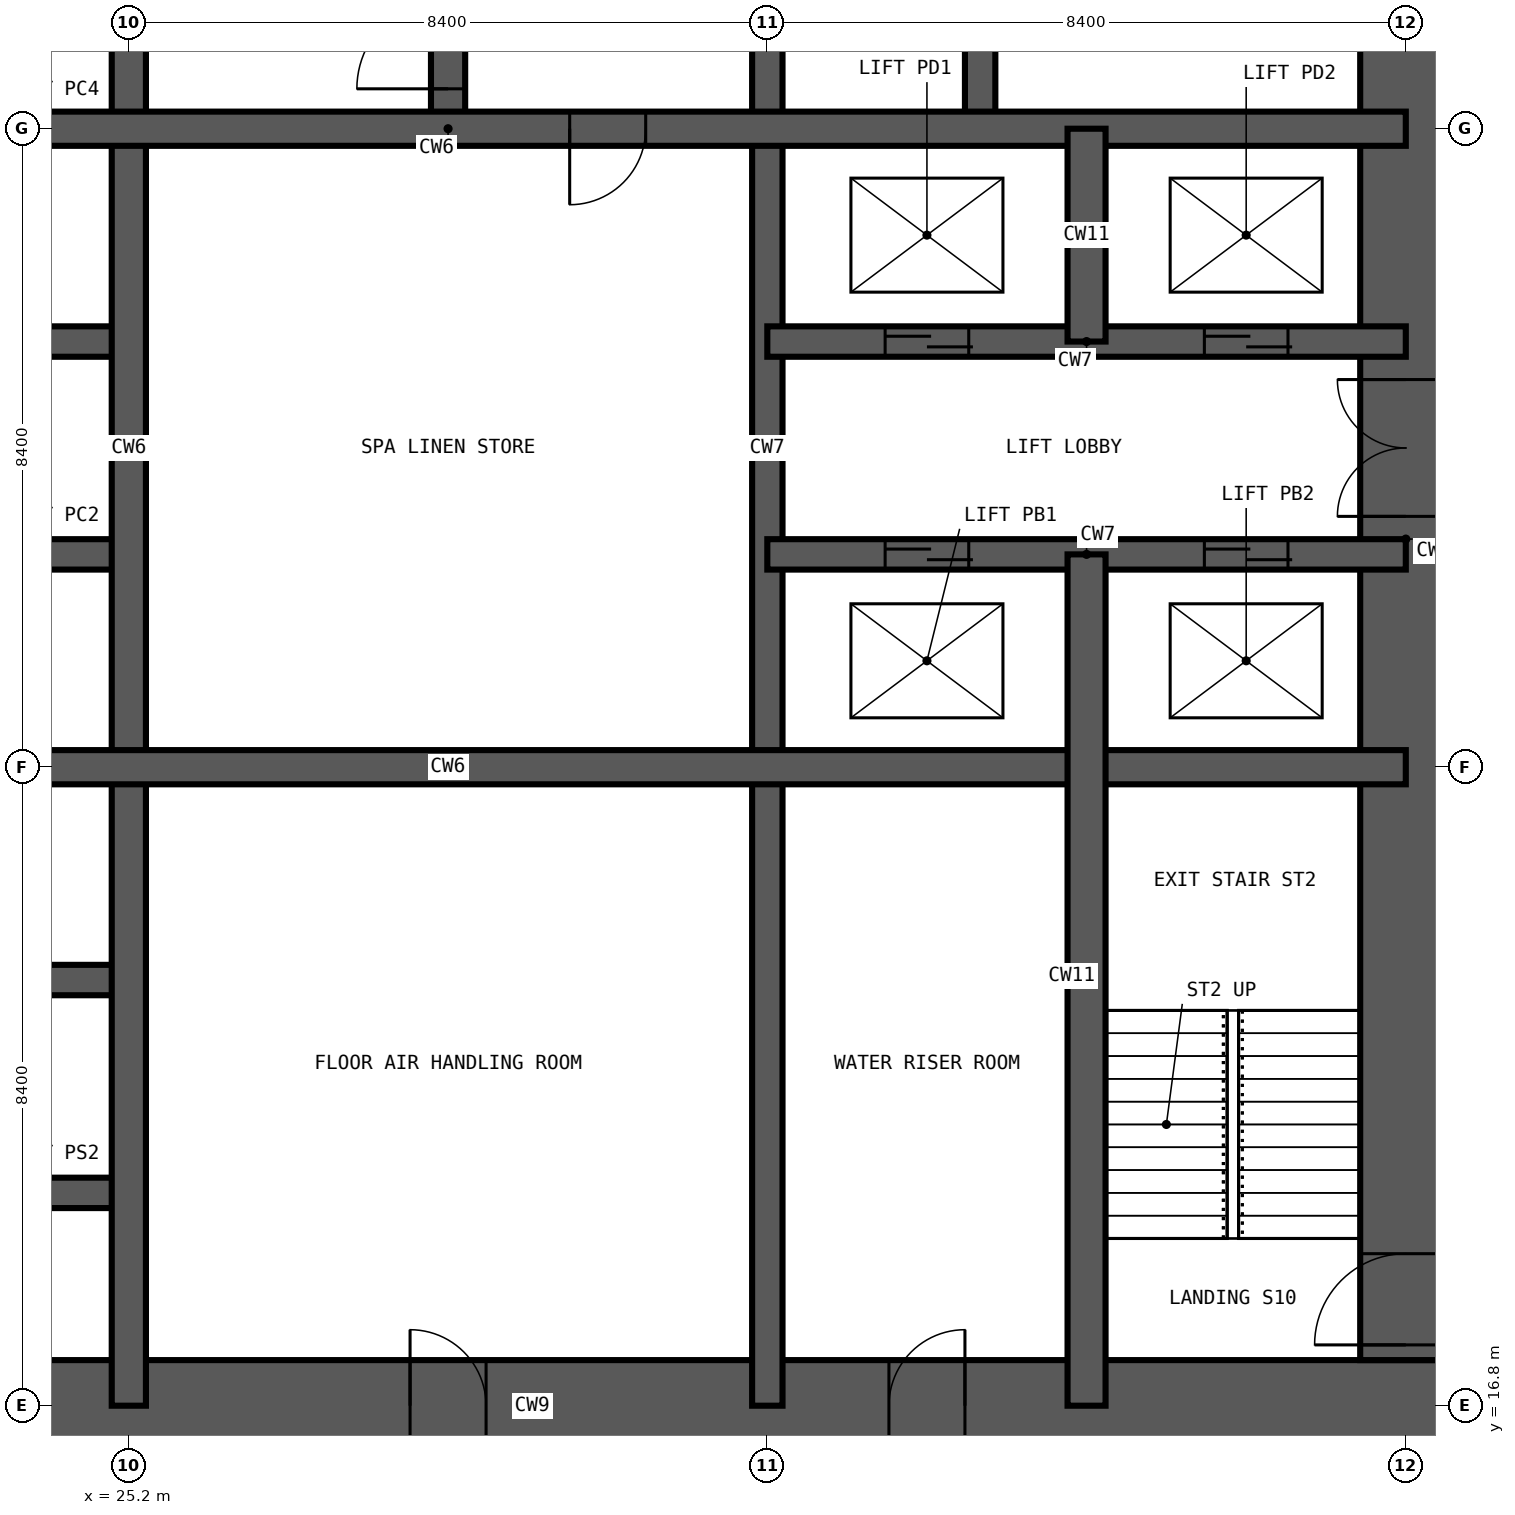
"""IFC4 building model, lengths in metres.
Left out: names, types, materials, properties, quantities, classifications, styles, units other than length and angle.
Written with IfcOpenShell. Run it as: python <this file> out.ifc"""

import sys

from ifc_helpers import new_model, si_unit, direction, frame, frame_2d, origin, place, context, subcontext, project, spatial, rectangle, extrude, element, fill, save


model = new_model("IFC4")
c1 = context("Model", 3, precision=1e-05, world=origin(), true_north=direction((0.0, 1.0)))
c2 = subcontext(c1, "Body", "Model", "MODEL_VIEW")
j1 = project(units=[si_unit("LENGTHUNIT", "METRE"), si_unit("PLANEANGLEUNIT", "RADIAN")], contexts=[c1])
p1 = place(None, origin())
s1 = spatial("IfcSite", under=j1, at=p1, CompositionType="ELEMENT")
p2 = place(p1, origin())
s2 = spatial("IfcBuilding", under=s1, at=p2, CompositionType="ELEMENT")
p3 = place(p2, frame((0.0, 0.0, 147.6)))
s3 = spatial("IfcBuildingStorey", under=s2, at=p3, CompositionType="ELEMENT", Elevation=147.6)
p4 = place(p3, frame((16.2, 16.8, -0.35), z_axis=(0.0, 0.0, 1.0), x_axis=(1.0, 0.0, 0.0)))
e1 = element("IfcWall", 1, at=p4, inside=s3, PredefinedType="SHEAR", context=c2, shape_type="SweptSolid", body=[
    extrude(rectangle(XDim=26.4, YDim=1.2, at=frame_2d((13.2, 0.0))), origin(), (0.0, 0.0, 1.0), 5.95),
])
p5 = place(p4, frame((12.7, 0.0, 0.35)))
e2 = element("IfcOpeningElement", 2, at=p5, cuts=e1, PredefinedType="OPENING", context=c2, shape_type="SweptSolid", body=[
    extrude(rectangle(XDim=1.0, YDim=2.1, at=frame_2d((0.5, 1.05))), frame((0.0, 0.61, 0.0), z_axis=(0.0, -1.0, 0.0), x_axis=(1.0, 0.0, 0.0)), (0.0, 0.0, 1.0), 1.22),
])
p6 = place(p4, frame((19.0, 0.0, 0.35)))
e3 = element("IfcOpeningElement", 3, at=p6, cuts=e1, PredefinedType="OPENING", context=c2, shape_type="SweptSolid", body=[
    extrude(rectangle(XDim=1.0, YDim=2.1, at=frame_2d((0.5, 1.05))), frame((0.0, 0.61, 0.0), z_axis=(0.0, -1.0, 0.0), x_axis=(1.0, 0.0, 0.0)), (0.0, 0.0, 1.0), 1.22),
])
p7 = place(p3, frame((42.0, 17.4, -0.35), z_axis=(0.0, 0.0, 1.0), x_axis=(0.0, 1.0, 0.0)))
e4 = element("IfcWall", 4, at=p7, inside=s3, PredefinedType="SHEAR", context=c2, shape_type="SweptSolid", body=[
    extrude(rectangle(XDim=24.0, YDim=1.2, at=frame_2d((12.0, 0.0))), origin(), (0.0, 0.0, 1.0), 5.95),
])
p8 = place(p7, frame((0.2, 0.0, 0.35)))
e5 = element("IfcOpeningElement", 5, at=p8, cuts=e4, PredefinedType="OPENING", context=c2, shape_type="SweptSolid", body=[
    extrude(rectangle(XDim=1.2, YDim=2.2, at=frame_2d((0.6, 1.1))), frame((0.0, 0.61, 0.0), z_axis=(0.0, -1.0, 0.0), x_axis=(1.0, 0.0, 0.0)), (0.0, 0.0, 1.0), 1.22),
])
p9 = place(p7, frame((11.1, 0.0, 0.35)))
e6 = element("IfcOpeningElement", 6, at=p9, cuts=e4, PredefinedType="OPENING", context=c2, shape_type="SweptSolid", body=[
    extrude(rectangle(XDim=1.8, YDim=2.2, at=frame_2d((0.9, 1.1))), frame((0.0, 0.61, 0.0), z_axis=(0.0, -1.0, 0.0), x_axis=(1.0, 0.0, 0.0)), (0.0, 0.0, 1.0), 1.22),
])
p10 = place(p3, frame((33.6, 16.8, -0.35), z_axis=(0.0, 0.0, 1.0), x_axis=(0.0, 1.0, 0.0)))
e7 = element("IfcWall", 7, at=p10, inside=s3, PredefinedType="SHEAR", context=c2, shape_type="SweptSolid", body=[
    extrude(rectangle(XDim=25.2, YDim=0.4, at=frame_2d((12.6, 0.0))), origin(), (0.0, 0.0, 1.0), 5.95),
])
p11 = place(p10, frame((22.5, 0.0, 0.35)))
e8 = element("IfcOpeningElement", 8, at=p11, cuts=e7, PredefinedType="OPENING", context=c2, shape_type="SweptSolid", body=[
    extrude(rectangle(XDim=1.2, YDim=2.2, at=frame_2d((0.6, 1.1))), frame((0.0, 0.21, 0.0), z_axis=(0.0, -1.0, 0.0), x_axis=(1.0, 0.0, 0.0)), (0.0, 0.0, 1.0), 0.42),
])
p12 = place(p10, frame((18.3, 0.0, 0.35)))
e9 = element("IfcOpeningElement", 9, at=p12, cuts=e7, PredefinedType="OPENING", context=c2, shape_type="SweptSolid", body=[
    extrude(rectangle(XDim=1.2, YDim=2.2, at=frame_2d((0.6, 1.1))), frame((0.0, 0.21, 0.0), z_axis=(0.0, -1.0, 0.0), x_axis=(1.0, 0.0, 0.0)), (0.0, 0.0, 1.0), 0.42),
])
p13 = place(p3, frame((36.4, 33.6, -0.35), z_axis=(0.0, 0.0, 1.0), x_axis=(0.0, 1.0, 0.0)))
e10 = element("IfcWall", 10, at=p13, inside=s3, PredefinedType="SHEAR", context=c2, shape_type="SweptSolid", body=[
    extrude(rectangle(XDim=8.4, YDim=0.4, at=frame_2d((4.2, 0.0))), origin(), (0.0, 0.0, 1.0), 5.95),
])
p14 = place(p3, frame((16.8, 19.6, -0.35), z_axis=(0.0, 0.0, 1.0), x_axis=(1.0, 0.0, 0.0)))
e11 = element("IfcWall", 11, at=p14, inside=s3, PredefinedType="SHEAR", context=c2, shape_type="SweptSolid", body=[
    extrude(rectangle(XDim=8.4, YDim=0.4, at=frame_2d((4.2, 0.0))), origin(), (0.0, 0.0, 1.0), 5.95),
])
p15 = place(p14, frame((1.55, 0.0, 0.35)))
e12 = element("IfcOpeningElement", 12, at=p15, cuts=e11, PredefinedType="OPENING", context=c2, shape_type="SweptSolid", body=[
    extrude(rectangle(XDim=1.1, YDim=2.2, at=frame_2d((0.55, 1.1))), frame((0.0, 0.21, 0.0), z_axis=(0.0, -1.0, 0.0), x_axis=(1.0, 0.0, 0.0)), (0.0, 0.0, 1.0), 0.42),
])
p16 = place(p14, frame((5.75, 0.0, 0.35)))
e13 = element("IfcOpeningElement", 13, at=p16, cuts=e11, PredefinedType="OPENING", context=c2, shape_type="SweptSolid", body=[
    extrude(rectangle(XDim=1.1, YDim=2.2, at=frame_2d((0.55, 1.1))), frame((0.0, 0.21, 0.0), z_axis=(0.0, -1.0, 0.0), x_axis=(1.0, 0.0, 0.0)), (0.0, 0.0, 1.0), 0.42),
])
p17 = place(p3, frame((16.8, 22.4, -0.35), z_axis=(0.0, 0.0, 1.0), x_axis=(1.0, 0.0, 0.0)))
e14 = element("IfcWall", 14, at=p17, inside=s3, PredefinedType="SHEAR", context=c2, shape_type="SweptSolid", body=[
    extrude(rectangle(XDim=8.4, YDim=0.4, at=frame_2d((4.2, 0.0))), origin(), (0.0, 0.0, 1.0), 5.95),
])
p18 = place(p17, frame((1.55, 0.0, 0.35)))
e15 = element("IfcOpeningElement", 15, at=p18, cuts=e14, PredefinedType="OPENING", context=c2, shape_type="SweptSolid", body=[
    extrude(rectangle(XDim=1.1, YDim=2.2, at=frame_2d((0.55, 1.1))), frame((0.0, 0.21, 0.0), z_axis=(0.0, -1.0, 0.0), x_axis=(1.0, 0.0, 0.0)), (0.0, 0.0, 1.0), 0.42),
])
p19 = place(p17, frame((5.75, 0.0, 0.35)))
e16 = element("IfcOpeningElement", 16, at=p19, cuts=e14, PredefinedType="OPENING", context=c2, shape_type="SweptSolid", body=[
    extrude(rectangle(XDim=1.1, YDim=2.2, at=frame_2d((0.55, 1.1))), frame((0.0, 0.21, 0.0), z_axis=(0.0, -1.0, 0.0), x_axis=(1.0, 0.0, 0.0)), (0.0, 0.0, 1.0), 0.42),
])
p20 = place(p3, frame((16.8, 28.0, -0.35), z_axis=(0.0, 0.0, 1.0), x_axis=(1.0, 0.0, 0.0)))
e17 = element("IfcWall", 17, at=p20, inside=s3, PredefinedType="SHEAR", context=c2, shape_type="SweptSolid", body=[
    extrude(rectangle(XDim=8.4, YDim=0.4, at=frame_2d((4.2, 0.0))), origin(), (0.0, 0.0, 1.0), 5.95),
])
p21 = place(p20, frame((1.55, 0.0, 0.35)))
e18 = element("IfcOpeningElement", 18, at=p21, cuts=e17, PredefinedType="OPENING", context=c2, shape_type="SweptSolid", body=[
    extrude(rectangle(XDim=1.1, YDim=2.2, at=frame_2d((0.55, 1.1))), frame((0.0, 0.21, 0.0), z_axis=(0.0, -1.0, 0.0), x_axis=(1.0, 0.0, 0.0)), (0.0, 0.0, 1.0), 0.42),
])
p22 = place(p20, frame((5.75, 0.0, 0.35)))
e19 = element("IfcOpeningElement", 19, at=p22, cuts=e17, PredefinedType="OPENING", context=c2, shape_type="SweptSolid", body=[
    extrude(rectangle(XDim=1.1, YDim=2.2, at=frame_2d((0.55, 1.1))), frame((0.0, 0.21, 0.0), z_axis=(0.0, -1.0, 0.0), x_axis=(1.0, 0.0, 0.0)), (0.0, 0.0, 1.0), 0.42),
])
p23 = place(p3, frame((33.6, 28.0, -0.35), z_axis=(0.0, 0.0, 1.0), x_axis=(1.0, 0.0, 0.0)))
e20 = element("IfcWall", 20, at=p23, inside=s3, PredefinedType="SHEAR", context=c2, shape_type="SweptSolid", body=[
    extrude(rectangle(XDim=8.4, YDim=0.4, at=frame_2d((4.2, 0.0))), origin(), (0.0, 0.0, 1.0), 5.95),
])
p24 = place(p23, frame((1.55, 0.0, 0.35)))
e21 = element("IfcOpeningElement", 21, at=p24, cuts=e20, PredefinedType="OPENING", context=c2, shape_type="SweptSolid", body=[
    extrude(rectangle(XDim=1.1, YDim=2.2, at=frame_2d((0.55, 1.1))), frame((0.0, 0.21, 0.0), z_axis=(0.0, -1.0, 0.0), x_axis=(1.0, 0.0, 0.0)), (0.0, 0.0, 1.0), 0.42),
])
p25 = place(p23, frame((5.75, 0.0, 0.35)))
e22 = element("IfcOpeningElement", 22, at=p25, cuts=e20, PredefinedType="OPENING", context=c2, shape_type="SweptSolid", body=[
    extrude(rectangle(XDim=1.1, YDim=2.2, at=frame_2d((0.55, 1.1))), frame((0.0, 0.21, 0.0), z_axis=(0.0, -1.0, 0.0), x_axis=(1.0, 0.0, 0.0)), (0.0, 0.0, 1.0), 0.42),
])
p26 = place(p3, frame((16.8, 30.8, -0.35), z_axis=(0.0, 0.0, 1.0), x_axis=(1.0, 0.0, 0.0)))
e23 = element("IfcWall", 23, at=p26, inside=s3, PredefinedType="SHEAR", context=c2, shape_type="SweptSolid", body=[
    extrude(rectangle(XDim=8.4, YDim=0.4, at=frame_2d((4.2, 0.0))), origin(), (0.0, 0.0, 1.0), 5.95),
])
p27 = place(p26, frame((1.55, 0.0, 0.35)))
e24 = element("IfcOpeningElement", 24, at=p27, cuts=e23, PredefinedType="OPENING", context=c2, shape_type="SweptSolid", body=[
    extrude(rectangle(XDim=1.1, YDim=2.2, at=frame_2d((0.55, 1.1))), frame((0.0, 0.21, 0.0), z_axis=(0.0, -1.0, 0.0), x_axis=(1.0, 0.0, 0.0)), (0.0, 0.0, 1.0), 0.42),
])
p28 = place(p26, frame((5.75, 0.0, 0.35)))
e25 = element("IfcOpeningElement", 25, at=p28, cuts=e23, PredefinedType="OPENING", context=c2, shape_type="SweptSolid", body=[
    extrude(rectangle(XDim=1.1, YDim=2.2, at=frame_2d((0.55, 1.1))), frame((0.0, 0.21, 0.0), z_axis=(0.0, -1.0, 0.0), x_axis=(1.0, 0.0, 0.0)), (0.0, 0.0, 1.0), 0.42),
])
p29 = place(p3, frame((33.6, 30.8, -0.35), z_axis=(0.0, 0.0, 1.0), x_axis=(1.0, 0.0, 0.0)))
e26 = element("IfcWall", 26, at=p29, inside=s3, PredefinedType="SHEAR", context=c2, shape_type="SweptSolid", body=[
    extrude(rectangle(XDim=8.4, YDim=0.4, at=frame_2d((4.2, 0.0))), origin(), (0.0, 0.0, 1.0), 5.95),
])
p30 = place(p29, frame((1.55, 0.0, 0.35)))
e27 = element("IfcOpeningElement", 27, at=p30, cuts=e26, PredefinedType="OPENING", context=c2, shape_type="SweptSolid", body=[
    extrude(rectangle(XDim=1.1, YDim=2.2, at=frame_2d((0.55, 1.1))), frame((0.0, 0.21, 0.0), z_axis=(0.0, -1.0, 0.0), x_axis=(1.0, 0.0, 0.0)), (0.0, 0.0, 1.0), 0.42),
])
p31 = place(p29, frame((5.75, 0.0, 0.35)))
e28 = element("IfcOpeningElement", 28, at=p31, cuts=e26, PredefinedType="OPENING", context=c2, shape_type="SweptSolid", body=[
    extrude(rectangle(XDim=1.1, YDim=2.2, at=frame_2d((0.55, 1.1))), frame((0.0, 0.21, 0.0), z_axis=(0.0, -1.0, 0.0), x_axis=(1.0, 0.0, 0.0)), (0.0, 0.0, 1.0), 0.42),
])
p32 = place(p3, frame((25.2, 16.8, -0.35), z_axis=(0.0, 0.0, 1.0), x_axis=(0.0, 1.0, 0.0)))
e29 = element("IfcWall", 29, at=p32, inside=s3, PredefinedType="SHEAR", context=c2, shape_type="SweptSolid", body=[
    extrude(rectangle(XDim=25.2, YDim=0.45, at=frame_2d((12.6, 0.0))), origin(), (0.0, 0.0, 1.0), 5.95),
])
p33 = place(p3, frame((29.4, 33.6, -0.35), z_axis=(0.0, 0.0, 1.0), x_axis=(0.0, 1.0, 0.0)))
e30 = element("IfcWall", 30, at=p33, inside=s3, PredefinedType="SHEAR", context=c2, shape_type="SweptSolid", body=[
    extrude(rectangle(XDim=8.4, YDim=0.45, at=frame_2d((4.2, 0.0))), origin(), (0.0, 0.0, 1.0), 5.95),
])
p34 = place(p33, frame((0.525, 0.0, 0.35)))
e31 = element("IfcOpeningElement", 31, at=p34, cuts=e30, PredefinedType="OPENING", context=c2, shape_type="SweptSolid", body=[
    extrude(rectangle(XDim=1.2, YDim=2.2, at=frame_2d((0.6, 1.1))), frame((0.0, 0.235, 0.0), z_axis=(0.0, -1.0, 0.0), x_axis=(1.0, 0.0, 0.0)), (0.0, 0.0, 1.0), 0.47),
])
p35 = place(p3, frame((16.8, 25.2, -0.35), z_axis=(0.0, 0.0, 1.0), x_axis=(1.0, 0.0, 0.0)))
e32 = element("IfcWall", 32, at=p35, inside=s3, PredefinedType="SHEAR", context=c2, shape_type="SweptSolid", body=[
    extrude(rectangle(XDim=25.2, YDim=0.45, at=frame_2d((12.6, 0.0))), origin(), (0.0, 0.0, 1.0), 5.95),
])
p36 = place(p3, frame((16.8, 33.6, -0.35), z_axis=(0.0, 0.0, 1.0), x_axis=(1.0, 0.0, 0.0)))
e33 = element("IfcWall", 33, at=p36, inside=s3, PredefinedType="SHEAR", context=c2, shape_type="SweptSolid", body=[
    extrude(rectangle(XDim=25.2, YDim=0.45, at=frame_2d((12.6, 0.0))), origin(), (0.0, 0.0, 1.0), 5.95),
])
p37 = place(p36, frame((14.2, 0.0, 0.35)))
e34 = element("IfcOpeningElement", 34, at=p37, cuts=e33, PredefinedType="OPENING", context=c2, shape_type="SweptSolid", body=[
    extrude(rectangle(XDim=1.0, YDim=2.1, at=frame_2d((0.5, 1.05))), frame((0.0, 0.235, 0.0), z_axis=(0.0, -1.0, 0.0), x_axis=(1.0, 0.0, 0.0)), (0.0, 0.0, 1.0), 0.47),
])
p38 = place(p3, frame((37.8, 16.8, -0.35), z_axis=(0.0, 0.0, 1.0), x_axis=(0.0, 1.0, 0.0)))
e35 = element("IfcWall", 35, at=p38, inside=s3, PredefinedType="SHEAR", context=c2, shape_type="SweptSolid", body=[
    extrude(rectangle(XDim=11.2, YDim=0.5, at=frame_2d((5.6, 0.0))), origin(), (0.0, 0.0, 1.0), 5.95),
])
p39 = place(p3, frame((37.8, 30.8, -0.35), z_axis=(0.0, 0.0, 1.0), x_axis=(0.0, 1.0, 0.0)))
e36 = element("IfcWall", 36, at=p39, inside=s3, PredefinedType="SHEAR", context=c2, shape_type="SweptSolid", body=[
    extrude(rectangle(XDim=2.8, YDim=0.5, at=frame_2d((1.4, 0.0))), origin(), (0.0, 0.0, 1.0), 5.95),
])
p40 = place(p34, origin())
e37 = element("IfcDoor", 37, at=p40, inside=s3, OperationType="SINGLE_SWING_LEFT", PredefinedType="DOOR", context=c2, shape_type="SweptSolid", body=[
    extrude(rectangle(XDim=1.2, YDim=2.2, at=frame_2d((0.6, 1.1))), frame((0.0, 0.025, 0.0), z_axis=(0.0, -1.0, 0.0), x_axis=(1.0, 0.0, 0.0)), (0.0, 0.0, 1.0), 0.05),
])
fill(e31, e37)
p41 = place(p8, origin())
e38 = element("IfcDoor", 38, at=p41, inside=s3, OperationType="SINGLE_SWING_LEFT", PredefinedType="DOOR", context=c2, shape_type="SweptSolid", body=[
    extrude(rectangle(XDim=1.2, YDim=2.2, at=frame_2d((0.6, 1.1))), frame((0.0, 0.025, 0.0), z_axis=(0.0, -1.0, 0.0), x_axis=(1.0, 0.0, 0.0)), (0.0, 0.0, 1.0), 0.05),
])
fill(e5, e38)
p42 = place(p24, origin())
e39 = element("IfcDoor", 39, at=p42, inside=s3, OperationType="DOUBLE_DOOR_SLIDING", PredefinedType="DOOR", context=c2, shape_type="SweptSolid", body=[
    extrude(rectangle(XDim=1.1, YDim=2.2, at=frame_2d((0.55, 1.1))), frame((0.0, 0.025, 0.0), z_axis=(0.0, -1.0, 0.0), x_axis=(1.0, 0.0, 0.0)), (0.0, 0.0, 1.0), 0.05),
])
fill(e21, e39)
p43 = place(p25, origin())
e40 = element("IfcDoor", 40, at=p43, inside=s3, OperationType="DOUBLE_DOOR_SLIDING", PredefinedType="DOOR", context=c2, shape_type="SweptSolid", body=[
    extrude(rectangle(XDim=1.1, YDim=2.2, at=frame_2d((0.55, 1.1))), frame((0.0, 0.025, 0.0), z_axis=(0.0, -1.0, 0.0), x_axis=(1.0, 0.0, 0.0)), (0.0, 0.0, 1.0), 0.05),
])
fill(e22, e40)
p44 = place(p30, origin())
e41 = element("IfcDoor", 41, at=p44, inside=s3, OperationType="DOUBLE_DOOR_SLIDING", PredefinedType="DOOR", context=c2, shape_type="SweptSolid", body=[
    extrude(rectangle(XDim=1.1, YDim=2.2, at=frame_2d((0.55, 1.1))), frame((0.0, 0.025, 0.0), z_axis=(0.0, -1.0, 0.0), x_axis=(1.0, 0.0, 0.0)), (0.0, 0.0, 1.0), 0.05),
])
fill(e27, e41)
p45 = place(p31, origin())
e42 = element("IfcDoor", 42, at=p45, inside=s3, OperationType="DOUBLE_DOOR_SLIDING", PredefinedType="DOOR", context=c2, shape_type="SweptSolid", body=[
    extrude(rectangle(XDim=1.1, YDim=2.2, at=frame_2d((0.55, 1.1))), frame((0.0, 0.025, 0.0), z_axis=(0.0, -1.0, 0.0), x_axis=(1.0, 0.0, 0.0)), (0.0, 0.0, 1.0), 0.05),
])
fill(e28, e42)
p46 = place(p37, frame((1.0, 0.0, 0.0), z_axis=(0.0, 0.0, 1.0), x_axis=(-1.0, 0.0, 0.0)))
e43 = element("IfcDoor", 43, at=p46, inside=s3, OperationType="SINGLE_SWING_RIGHT", PredefinedType="DOOR", context=c2, shape_type="SweptSolid", body=[
    extrude(rectangle(XDim=1.0, YDim=2.1, at=frame_2d((0.5, 1.05))), frame((0.0, 0.025, 0.0), z_axis=(0.0, -1.0, 0.0), x_axis=(1.0, 0.0, 0.0)), (0.0, 0.0, 1.0), 0.05),
])
fill(e34, e43)
p47 = place(p9, origin())
e44 = element("IfcDoor", 44, at=p47, inside=s3, OperationType="DOUBLE_DOOR_DOUBLE_SWING", PredefinedType="DOOR", context=c2, shape_type="SweptSolid", body=[
    extrude(rectangle(XDim=1.8, YDim=2.2, at=frame_2d((0.9, 1.1))), frame((0.0, 0.025, 0.0), z_axis=(0.0, -1.0, 0.0), x_axis=(1.0, 0.0, 0.0)), (0.0, 0.0, 1.0), 0.05),
])
fill(e6, e44)
p48 = place(p5, origin())
e45 = element("IfcDoor", 45, at=p48, inside=s3, OperationType="SINGLE_SWING_LEFT", PredefinedType="DOOR", context=c2, shape_type="SweptSolid", body=[
    extrude(rectangle(XDim=1.0, YDim=2.1, at=frame_2d((0.5, 1.05))), frame((0.0, 0.025, 0.0), z_axis=(0.0, -1.0, 0.0), x_axis=(1.0, 0.0, 0.0)), (0.0, 0.0, 1.0), 0.05),
])
fill(e2, e45)
p49 = place(p6, origin())
e46 = element("IfcDoor", 46, at=p49, inside=s3, OperationType="SINGLE_SWING_RIGHT", PredefinedType="DOOR", context=c2, shape_type="SweptSolid", body=[
    extrude(rectangle(XDim=1.0, YDim=2.1, at=frame_2d((0.5, 1.05))), frame((0.0, 0.025, 0.0), z_axis=(0.0, -1.0, 0.0), x_axis=(1.0, 0.0, 0.0)), (0.0, 0.0, 1.0), 0.05),
])
fill(e3, e46)
save(model, sys.argv[1])
